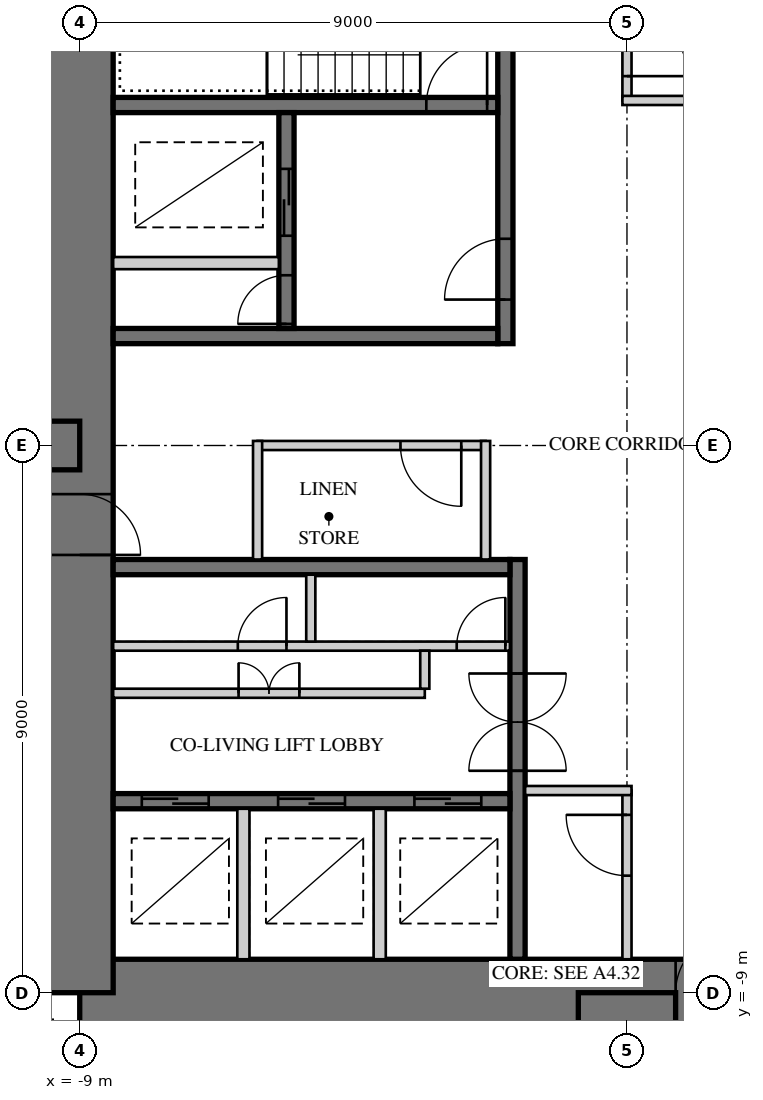
"""IFC4 building model, lengths in metres.
Left out: names, types, materials, properties, quantities, classifications, styles, units other than length and angle.
Written with IfcOpenShell. Run it as: python <this file> out.ifc"""

import sys

from ifc_helpers import new_model, si_unit, direction, frame, frame_2d, origin, place, context, subcontext, project, spatial, rectangle, extrude, element, fill, save


model = new_model("IFC4")
c1 = context("Model", 3, precision=1e-05, world=origin(), true_north=direction((0.0, 1.0)))
c2 = subcontext(c1, "Body", "Model", "MODEL_VIEW")
j1 = project(units=[si_unit("LENGTHUNIT", "METRE"), si_unit("PLANEANGLEUNIT", "RADIAN")], contexts=[c1])
p1 = place(None, origin())
s1 = spatial("IfcSite", under=j1, at=p1, CompositionType="ELEMENT")
p2 = place(p1, origin())
s2 = spatial("IfcBuilding", under=s1, at=p2, CompositionType="ELEMENT")
p3 = place(p2, frame((0.0, 0.0, 206.9)))
s3 = spatial("IfcBuildingStorey", under=s2, at=p3, CompositionType="ELEMENT", Elevation=206.9)
p4 = place(p3, frame((-9.0, -9.0, 0.0), z_axis=(0.0, 0.0, 1.0), x_axis=(1.0, 0.0, 0.0)))
e1 = element("IfcWall", 1, at=p4, inside=s3, PredefinedType="SHEAR", context=c2, shape_type="SweptSolid", body=[
    extrude(rectangle(XDim=18.0, YDim=1.1, at=frame_2d((9.0, 0.0))), origin(), (0.0, 0.0, 1.0), 3.4),
])
p5 = place(p4, frame((9.8, 0.0, 0.0)))
e2 = element("IfcOpeningElement", 2, at=p5, cuts=e1, PredefinedType="OPENING", context=c2, shape_type="SweptSolid", body=[
    extrude(rectangle(XDim=1.0, YDim=2.4, at=frame_2d((0.5, 1.2))), frame((0.0, 0.56, 0.0), z_axis=(0.0, -1.0, 0.0), x_axis=(1.0, 0.0, 0.0)), (0.0, 0.0, 1.0), 1.12),
])
p6 = place(p3, frame((-9.0, 9.0, 0.0), z_axis=(0.0, 0.0, 1.0), x_axis=(0.0, -1.0, 0.0)))
e3 = element("IfcWall", 3, at=p6, inside=s3, PredefinedType="SHEAR", context=c2, shape_type="SweptSolid", body=[
    extrude(rectangle(XDim=18.0, YDim=1.1, at=frame_2d((9.0, 0.0))), origin(), (0.0, 0.0, 1.0), 3.4),
])
p7 = place(p6, frame((9.8, 0.0, 0.0)))
e4 = element("IfcOpeningElement", 4, at=p7, cuts=e3, PredefinedType="OPENING", context=c2, shape_type="SweptSolid", body=[
    extrude(rectangle(XDim=1.0, YDim=2.4, at=frame_2d((0.5, 1.2))), frame((0.0, 0.56, 0.0), z_axis=(0.0, -1.0, 0.0), x_axis=(1.0, 0.0, 0.0)), (0.0, 0.0, 1.0), 1.12),
])
p8 = place(p3, frame((-2.0, 1.675, 0.0), z_axis=(0.0, 0.0, 1.0), x_axis=(0.0, 1.0, 0.0)))
e5 = element("IfcWall", 5, at=p8, inside=s3, PredefinedType="SHEAR", context=c2, shape_type="SweptSolid", body=[
    extrude(rectangle(XDim=6.775, YDim=0.25, at=frame_2d((3.387, 0.0))), origin(), (0.0, 0.0, 1.0), 3.4),
])
p9 = place(p8, frame((0.725, 0.0, 0.0)))
e6 = element("IfcOpeningElement", 6, at=p9, cuts=e5, PredefinedType="OPENING", context=c2, shape_type="SweptSolid", body=[
    extrude(rectangle(XDim=1.0, YDim=2.1, at=frame_2d((0.5, 1.05))), frame((0.0, 0.135, 0.0), z_axis=(0.0, -1.0, 0.0), x_axis=(1.0, 0.0, 0.0)), (0.0, 0.0, 1.0), 0.27),
])
p10 = place(p3, frame((-2.125, 1.8, 0.0), z_axis=(0.0, 0.0, 1.0), x_axis=(-1.0, 0.0, 0.0)))
e7 = element("IfcWall", 7, at=p10, inside=s3, PredefinedType="SHEAR", context=c2, shape_type="SweptSolid", body=[
    extrude(rectangle(XDim=6.325, YDim=0.25, at=frame_2d((3.163, 0.0))), origin(), (0.0, 0.0, 1.0), 3.4),
])
p11 = place(p3, frame((-2.125, 5.6, 0.0), z_axis=(0.0, 0.0, 1.0), x_axis=(-1.0, 0.0, 0.0)))
e8 = element("IfcWall", 8, at=p11, inside=s3, PredefinedType="SHEAR", context=c2, shape_type="SweptSolid", body=[
    extrude(rectangle(XDim=6.325, YDim=0.25, at=frame_2d((3.163, 0.0))), origin(), (0.0, 0.0, 1.0), 3.4),
])
p12 = place(p11, frame((0.175, 0.0, 0.0)))
e9 = element("IfcOpeningElement", 9, at=p12, cuts=e8, PredefinedType="OPENING", context=c2, shape_type="SweptSolid", body=[
    extrude(rectangle(XDim=1.0, YDim=2.1, at=frame_2d((0.5, 1.05))), frame((0.0, 0.135, 0.0), z_axis=(0.0, -1.0, 0.0), x_axis=(1.0, 0.0, 0.0)), (0.0, 0.0, 1.0), 0.27),
])
p13 = place(p3, frame((-5.6, 1.925, 0.0), z_axis=(0.0, 0.0, 1.0), x_axis=(0.0, 1.0, 0.0)))
e10 = element("IfcWall", 10, at=p13, inside=s3, PredefinedType="SHEAR", context=c2, shape_type="SweptSolid", body=[
    extrude(rectangle(XDim=3.55, YDim=0.25, at=frame_2d((1.775, 0.0))), origin(), (0.0, 0.0, 1.0), 3.4),
])
p14 = place(p13, frame((1.525, 0.0, 0.0)))
e11 = element("IfcOpeningElement", 11, at=p14, cuts=e10, PredefinedType="OPENING", context=c2, shape_type="SweptSolid", body=[
    extrude(rectangle(XDim=1.1, YDim=2.2, at=frame_2d((0.55, 1.1))), frame((0.0, 0.135, 0.0), z_axis=(0.0, -1.0, 0.0), x_axis=(1.0, 0.0, 0.0)), (0.0, 0.0, 1.0), 0.27),
])
p15 = place(p13, frame((0.075, 0.0, 0.0)))
e12 = element("IfcOpeningElement", 12, at=p15, cuts=e10, PredefinedType="OPENING", context=c2, shape_type="SweptSolid", body=[
    extrude(rectangle(XDim=0.8, YDim=2.1, at=frame_2d((0.4, 1.05))), frame((0.0, 0.135, 0.0), z_axis=(0.0, -1.0, 0.0), x_axis=(1.0, 0.0, 0.0)), (0.0, 0.0, 1.0), 0.27),
])
p16 = place(p3, frame((-5.725, 3.0, 0.0), z_axis=(0.0, 0.0, 1.0), x_axis=(-1.0, 0.0, 0.0)))
e13 = element("IfcWall", 13, at=p16, inside=s3, PredefinedType="PARTITIONING", context=c2, shape_type="SweptSolid", body=[
    extrude(rectangle(XDim=2.725, YDim=0.2, at=frame_2d((1.362, 0.0))), origin(), (0.0, 0.0, 1.0), 3.4),
])
p17 = place(p3, frame((-1.8, -1.875, 0.0), z_axis=(0.0, 0.0, 1.0), x_axis=(0.0, -1.0, 0.0)))
e14 = element("IfcWall", 14, at=p17, inside=s3, PredefinedType="SHEAR", context=c2, shape_type="SweptSolid", body=[
    extrude(rectangle(XDim=6.575, YDim=0.25, at=frame_2d((3.288, 0.0))), origin(), (0.0, 0.0, 1.0), 3.4),
])
p18 = place(p17, frame((1.875, 0.0, 0.0)))
e15 = element("IfcOpeningElement", 15, at=p18, cuts=e14, PredefinedType="OPENING", context=c2, shape_type="SweptSolid", body=[
    extrude(rectangle(XDim=1.6, YDim=2.4, at=frame_2d((0.8, 1.2))), frame((0.0, 0.135, 0.0), z_axis=(0.0, -1.0, 0.0), x_axis=(1.0, 0.0, 0.0)), (0.0, 0.0, 1.0), 0.27),
])
p19 = place(p3, frame((-1.925, -2.0, 0.0), z_axis=(0.0, 0.0, 1.0), x_axis=(-1.0, 0.0, 0.0)))
e16 = element("IfcWall", 16, at=p19, inside=s3, PredefinedType="SHEAR", context=c2, shape_type="SweptSolid", body=[
    extrude(rectangle(XDim=6.525, YDim=0.25, at=frame_2d((3.262, 0.0))), origin(), (0.0, 0.0, 1.0), 3.4),
])
p20 = place(p3, frame((-1.925, -5.85, 0.0), z_axis=(0.0, 0.0, 1.0), x_axis=(-1.0, 0.0, 0.0)))
e17 = element("IfcWall", 17, at=p20, inside=s3, PredefinedType="SHEAR", context=c2, shape_type="SweptSolid", body=[
    extrude(rectangle(XDim=6.525, YDim=0.25, at=frame_2d((3.262, 0.0))), origin(), (0.0, 0.0, 1.0), 3.4),
])
p21 = place(p20, frame((0.471, 0.0, 0.0)))
e18 = element("IfcOpeningElement", 18, at=p21, cuts=e17, PredefinedType="OPENING", context=c2, shape_type="SweptSolid", body=[
    extrude(rectangle(XDim=1.1, YDim=2.2, at=frame_2d((0.55, 1.1))), frame((0.0, 0.135, 0.0), z_axis=(0.0, -1.0, 0.0), x_axis=(1.0, 0.0, 0.0)), (0.0, 0.0, 1.0), 0.27),
])
p22 = place(p20, frame((2.712, 0.0, 0.0)))
e19 = element("IfcOpeningElement", 19, at=p22, cuts=e17, PredefinedType="OPENING", context=c2, shape_type="SweptSolid", body=[
    extrude(rectangle(XDim=1.1, YDim=2.2, at=frame_2d((0.55, 1.1))), frame((0.0, 0.135, 0.0), z_axis=(0.0, -1.0, 0.0), x_axis=(1.0, 0.0, 0.0)), (0.0, 0.0, 1.0), 0.27),
])
p23 = place(p20, frame((4.954, 0.0, 0.0)))
e20 = element("IfcOpeningElement", 20, at=p23, cuts=e17, PredefinedType="OPENING", context=c2, shape_type="SweptSolid", body=[
    extrude(rectangle(XDim=1.1, YDim=2.2, at=frame_2d((0.55, 1.1))), frame((0.0, 0.135, 0.0), z_axis=(0.0, -1.0, 0.0), x_axis=(1.0, 0.0, 0.0)), (0.0, 0.0, 1.0), 0.27),
])
p24 = place(p3, frame((-1.925, -3.3, 0.0), z_axis=(0.0, 0.0, 1.0), x_axis=(-1.0, 0.0, 0.0)))
e21 = element("IfcWall", 21, at=p24, inside=s3, PredefinedType="PARTITIONING", context=c2, shape_type="SweptSolid", body=[
    extrude(rectangle(XDim=6.525, YDim=0.15, at=frame_2d((3.262, 0.0))), origin(), (0.0, 0.0, 1.0), 3.4),
])
p25 = place(p24, frame((0.075, 0.0, 0.0)))
e22 = element("IfcOpeningElement", 22, at=p25, cuts=e21, PredefinedType="OPENING", context=c2, shape_type="SweptSolid", body=[
    extrude(rectangle(XDim=0.8, YDim=2.1, at=frame_2d((0.4, 1.05))), frame((0.0, 0.085, 0.0), z_axis=(0.0, -1.0, 0.0), x_axis=(1.0, 0.0, 0.0)), (0.0, 0.0, 1.0), 0.17),
])
p26 = place(p24, frame((3.675, 0.0, 0.0)))
e23 = element("IfcOpeningElement", 23, at=p26, cuts=e21, PredefinedType="OPENING", context=c2, shape_type="SweptSolid", body=[
    extrude(rectangle(XDim=0.8, YDim=2.1, at=frame_2d((0.4, 1.05))), frame((0.0, 0.085, 0.0), z_axis=(0.0, -1.0, 0.0), x_axis=(1.0, 0.0, 0.0)), (0.0, 0.0, 1.0), 0.17),
])
p27 = place(p3, frame((-5.2, -2.125, 0.0), z_axis=(0.0, 0.0, 1.0), x_axis=(0.0, -1.0, 0.0)))
e24 = element("IfcWall", 24, at=p27, inside=s3, PredefinedType="PARTITIONING", context=c2, shape_type="SweptSolid", body=[
    extrude(rectangle(XDim=1.1, YDim=0.15, at=frame_2d((0.55, 0.0))), origin(), (0.0, 0.0, 1.0), 3.4),
])
for number, where, z_axis, x_axis in (
    (25, (-4.067, -5.975, 0.0), (0.0, 0.0, 1.0), (0.0, -1.0, 0.0)),
    (26, (-6.308, -5.975, 0.0), (0.0, 0.0, 1.0), (0.0, -1.0, 0.0)),
):
    element("IfcWall", number, at=place(p3, frame(where, z_axis=z_axis, x_axis=x_axis)), inside=s3, PredefinedType="PARTITIONING", context=c2, shape_type="SweptSolid", body=[
        extrude(rectangle(XDim=2.475, YDim=0.2, at=frame_2d((1.237, 0.0))), origin(), (0.0, 0.0, 1.0), 3.4),
    ])
p28 = place(p3, frame((0.0, -9.0, 0.0), z_axis=(0.0, 0.0, 1.0), x_axis=(0.0, -1.0, 0.0)))
e27 = element("IfcWall", 27, at=p28, inside=s3, PredefinedType="SHEAR", context=c2, shape_type="SweptSolid", body=[
    extrude(rectangle(XDim=4.05, YDim=1.6, at=frame_2d((2.025, 0.0))), origin(), (0.0, 0.0, 1.0), 3.4),
])
p29 = place(p3, frame((-9.0, 0.0, 0.0), z_axis=(0.0, 0.0, 1.0), x_axis=(-1.0, 0.0, 0.0)))
e28 = element("IfcWall", 28, at=p29, inside=s3, PredefinedType="SHEAR", context=c2, shape_type="SweptSolid", body=[
    extrude(rectangle(XDim=18.0, YDim=0.8, at=frame_2d((9.0, 0.0))), origin(), (0.0, 0.0, 1.0), 3.4),
])
p30 = place(p29, frame((3.95, 0.0, 0.0)))
e29 = element("IfcOpeningElement", 29, at=p30, cuts=e28, PredefinedType="OPENING", context=c2, shape_type="SweptSolid", body=[
    extrude(rectangle(XDim=1.0, YDim=2.15, at=frame_2d((0.5, 1.075))), frame((0.0, 0.41, 0.0), z_axis=(0.0, -1.0, 0.0), x_axis=(1.0, 0.0, 0.0)), (0.0, 0.0, 1.0), 0.82),
])
p31 = place(p29, frame((6.6, 0.0, 0.0)))
e30 = element("IfcOpeningElement", 30, at=p31, cuts=e28, PredefinedType="OPENING", context=c2, shape_type="SweptSolid", body=[
    extrude(rectangle(XDim=1.0, YDim=2.15, at=frame_2d((0.5, 1.075))), frame((0.0, 0.41, 0.0), z_axis=(0.0, -1.0, 0.0), x_axis=(1.0, 0.0, 0.0)), (0.0, 0.0, 1.0), 0.82),
])
p32 = place(p29, frame((13.25, 0.0, 0.0)))
e31 = element("IfcOpeningElement", 31, at=p32, cuts=e28, PredefinedType="OPENING", context=c2, shape_type="SweptSolid", body=[
    extrude(rectangle(XDim=1.0, YDim=2.2, at=frame_2d((0.5, 1.1))), frame((0.0, 0.41, 0.0), z_axis=(0.0, -1.0, 0.0), x_axis=(1.0, 0.0, 0.0)), (0.0, 0.0, 1.0), 0.82),
])
p33 = place(p3, frame((-9.57, -9.445, 0.0), z_axis=(0.0, 0.0, 1.0), x_axis=(0.0, -1.0, 0.0)))
e32 = element("IfcWall", 32, at=p33, inside=s3, PredefinedType="SOLIDWALL", context=c2, shape_type="SweptSolid", body=[
    extrude(rectangle(XDim=3.125, YDim=0.25, at=frame_2d((1.562, 0.0))), origin(), (0.0, 0.0, 1.0), 3.22),
])
p34 = place(p33, frame((0.6, 0.0, 0.0)))
e33 = element("IfcOpeningElement", 33, at=p34, cuts=e32, PredefinedType="OPENING", context=c2, shape_type="SweptSolid", body=[
    extrude(rectangle(XDim=1.0, YDim=2.2, at=frame_2d((0.5, 1.1))), frame((0.0, 0.135, 0.0), z_axis=(0.0, -1.0, 0.0), x_axis=(1.0, 0.0, 0.0)), (0.0, 0.0, 1.0), 0.27),
])
p35 = place(p3, frame((-2.325, 0.0, 0.0), z_axis=(0.0, 0.0, 1.0), x_axis=(-1.0, 0.0, 0.0)))
e34 = element("IfcWall", 34, at=p35, inside=s3, PredefinedType="PARTITIONING", context=c2, shape_type="SweptSolid", body=[
    extrude(rectangle(XDim=3.75, YDim=0.15, at=frame_2d((1.875, 0.0))), origin(), (0.0, 0.0, 1.0), 3.22),
])
p36 = place(p35, frame((0.4, 0.0, 0.0)))
e35 = element("IfcOpeningElement", 35, at=p36, cuts=e34, PredefinedType="OPENING", context=c2, shape_type="SweptSolid", body=[
    extrude(rectangle(XDim=1.0, YDim=2.1, at=frame_2d((0.5, 1.05))), frame((0.0, 0.085, 0.0), z_axis=(0.0, -1.0, 0.0), x_axis=(1.0, 0.0, 0.0)), (0.0, 0.0, 1.0), 0.17),
])
for number, where, z_axis, x_axis in (
    (36, (-2.325, -1.875, 0.0), (0.0, 0.0, 1.0), (0.0, 1.0, 0.0)),
    (37, (-6.075, 0.075, 0.0), (0.0, 0.0, 1.0), (0.0, -1.0, 0.0)),
):
    element("IfcWall", number, at=place(p3, frame(where, z_axis=z_axis, x_axis=x_axis)), inside=s3, PredefinedType="PARTITIONING", context=c2, shape_type="SweptSolid", body=[
        extrude(rectangle(XDim=1.95, YDim=0.15, at=frame_2d((0.975, 0.0))), origin(), (0.0, 0.0, 1.0), 3.22),
    ])
p37 = place(p3, frame((0.0, 5.675, 0.0), z_axis=(0.0, 0.0, 1.0), x_axis=(0.0, 1.0, 0.0)))
e38 = element("IfcWall", 38, at=p37, inside=s3, PredefinedType="PARTITIONING", context=c2, shape_type="SweptSolid", body=[
    extrude(rectangle(XDim=2.775, YDim=0.15, at=frame_2d((1.387, 0.0))), origin(), (0.0, 0.0, 1.0), 3.22),
])
p38 = place(p37, frame((0.4, 0.0, 0.0)))
e39 = element("IfcOpeningElement", 39, at=p38, cuts=e38, PredefinedType="OPENING", context=c2, shape_type="SweptSolid", body=[
    extrude(rectangle(XDim=1.0, YDim=2.1, at=frame_2d((0.5, 1.05))), frame((0.0, 0.085, 0.0), z_axis=(0.0, -1.0, 0.0), x_axis=(1.0, 0.0, 0.0)), (0.0, 0.0, 1.0), 0.17),
])
p39 = place(p3, frame((1.675, 5.675, 0.0), z_axis=(0.0, 0.0, 1.0), x_axis=(-1.0, 0.0, 0.0)))
e40 = element("IfcWall", 40, at=p39, inside=s3, PredefinedType="PARTITIONING", context=c2, shape_type="SweptSolid", body=[
    extrude(rectangle(XDim=1.75, YDim=0.15, at=frame_2d((0.875, 0.0))), origin(), (0.0, 0.0, 1.0), 3.22),
])
p40 = place(p3, frame((0.0, -5.675, 0.0), z_axis=(0.0, 0.0, 1.0), x_axis=(0.0, -1.0, 0.0)))
e41 = element("IfcWall", 41, at=p40, inside=s3, PredefinedType="PARTITIONING", context=c2, shape_type="SweptSolid", body=[
    extrude(rectangle(XDim=2.775, YDim=0.15, at=frame_2d((1.387, 0.0))), origin(), (0.0, 0.0, 1.0), 3.22),
])
p41 = place(p40, frame((0.4, 0.0, 0.0)))
e42 = element("IfcOpeningElement", 42, at=p41, cuts=e41, PredefinedType="OPENING", context=c2, shape_type="SweptSolid", body=[
    extrude(rectangle(XDim=1.0, YDim=2.1, at=frame_2d((0.5, 1.05))), frame((0.0, 0.085, 0.0), z_axis=(0.0, -1.0, 0.0), x_axis=(1.0, 0.0, 0.0)), (0.0, 0.0, 1.0), 0.17),
])
p42 = place(p3, frame((-1.675, -5.675, 0.0), z_axis=(0.0, 0.0, 1.0), x_axis=(1.0, 0.0, 0.0)))
e43 = element("IfcWall", 43, at=p42, inside=s3, PredefinedType="PARTITIONING", context=c2, shape_type="SweptSolid", body=[
    extrude(rectangle(XDim=1.75, YDim=0.15, at=frame_2d((0.875, 0.0))), origin(), (0.0, 0.0, 1.0), 3.22),
])
p43 = place(p3, frame((-3.325, -4.075, 0.0), z_axis=(0.0, 0.0, 1.0), x_axis=(-1.0, 0.0, 0.0)))
e44 = element("IfcWall", 44, at=p43, inside=s3, PredefinedType="PARTITIONING", context=c2, shape_type="SweptSolid", body=[
    extrude(rectangle(XDim=5.125, YDim=0.15, at=frame_2d((2.562, 0.0))), origin(), (0.0, 0.0, 1.0), 3.22),
])
p44 = place(p43, frame((2.062, 0.0, 0.0)))
e45 = element("IfcOpeningElement", 45, at=p44, cuts=e44, PredefinedType="OPENING", context=c2, shape_type="SweptSolid", body=[
    extrude(rectangle(XDim=1.0, YDim=2.1, at=frame_2d((0.5, 1.05))), frame((0.0, 0.085, 0.0), z_axis=(0.0, -1.0, 0.0), x_axis=(1.0, 0.0, 0.0)), (0.0, 0.0, 1.0), 0.17),
])
p45 = place(p3, frame((-3.325, -3.375, 0.0), z_axis=(0.0, 0.0, 1.0), x_axis=(0.0, -1.0, 0.0)))
e46 = element("IfcWall", 46, at=p45, inside=s3, PredefinedType="PARTITIONING", context=c2, shape_type="SweptSolid", body=[
    extrude(rectangle(XDim=0.625, YDim=0.15, at=frame_2d((0.312, 0.0))), origin(), (0.0, 0.0, 1.0), 3.22),
])
p46 = place(p36, origin())
e47 = element("IfcDoor", 47, at=p46, inside=s3, OperationType="SINGLE_SWING_LEFT", PredefinedType="DOOR", context=c2, shape_type="SweptSolid", body=[
    extrude(rectangle(XDim=1.0, YDim=2.1, at=frame_2d((0.5, 1.05))), frame((0.0, 0.025, 0.0), z_axis=(0.0, -1.0, 0.0), x_axis=(1.0, 0.0, 0.0)), (0.0, 0.0, 1.0), 0.05),
])
fill(e35, e47)
p47 = place(p38, frame((1.0, 0.0, 0.0), z_axis=(0.0, 0.0, 1.0), x_axis=(-1.0, 0.0, 0.0)))
e48 = element("IfcDoor", 48, at=p47, inside=s3, OperationType="SINGLE_SWING_RIGHT", PredefinedType="DOOR", context=c2, shape_type="SweptSolid", body=[
    extrude(rectangle(XDim=1.0, YDim=2.1, at=frame_2d((0.5, 1.05))), frame((0.0, 0.025, 0.0), z_axis=(0.0, -1.0, 0.0), x_axis=(1.0, 0.0, 0.0)), (0.0, 0.0, 1.0), 0.05),
])
fill(e39, e48)
p48 = place(p41, frame((1.0, 0.0, 0.0), z_axis=(0.0, 0.0, 1.0), x_axis=(-1.0, 0.0, 0.0)))
e49 = element("IfcDoor", 49, at=p48, inside=s3, OperationType="SINGLE_SWING_RIGHT", PredefinedType="DOOR", context=c2, shape_type="SweptSolid", body=[
    extrude(rectangle(XDim=1.0, YDim=2.1, at=frame_2d((0.5, 1.05))), frame((0.0, 0.025, 0.0), z_axis=(0.0, -1.0, 0.0), x_axis=(1.0, 0.0, 0.0)), (0.0, 0.0, 1.0), 0.05),
])
fill(e42, e49)
p49 = place(p44, frame((1.0, 0.0, 0.0), z_axis=(0.0, 0.0, 1.0), x_axis=(-1.0, 0.0, 0.0)))
e50 = element("IfcDoor", 50, at=p49, inside=s3, OperationType="DOUBLE_DOOR_SINGLE_SWING", PredefinedType="DOOR", context=c2, shape_type="SweptSolid", body=[
    extrude(rectangle(XDim=1.0, YDim=2.1, at=frame_2d((0.5, 1.05))), frame((0.0, 0.025, 0.0), z_axis=(0.0, -1.0, 0.0), x_axis=(1.0, 0.0, 0.0)), (0.0, 0.0, 1.0), 0.05),
])
fill(e45, e50)
p50 = place(p5, origin())
e51 = element("IfcDoor", 51, at=p50, inside=s3, OperationType="SINGLE_SWING_RIGHT", PredefinedType="DOOR", context=c2, shape_type="SweptSolid", body=[
    extrude(rectangle(XDim=1.0, YDim=2.4, at=frame_2d((0.5, 1.2))), frame((0.0, 0.055, 0.0), z_axis=(0.0, -1.0, 0.0), x_axis=(1.0, 0.0, 0.0)), (0.0, 0.0, 1.0), 0.05),
])
fill(e2, e51)
p51 = place(p7, origin())
e52 = element("IfcDoor", 52, at=p51, inside=s3, OperationType="SINGLE_SWING_RIGHT", PredefinedType="DOOR", context=c2, shape_type="SweptSolid", body=[
    extrude(rectangle(XDim=1.0, YDim=2.4, at=frame_2d((0.5, 1.2))), frame((0.0, 0.055, 0.0), z_axis=(0.0, -1.0, 0.0), x_axis=(1.0, 0.0, 0.0)), (0.0, 0.0, 1.0), 0.05),
])
fill(e4, e52)
p52 = place(p9, origin())
e53 = element("IfcDoor", 53, at=p52, inside=s3, OperationType="SINGLE_SWING_LEFT", PredefinedType="DOOR", context=c2, shape_type="SweptSolid", body=[
    extrude(rectangle(XDim=1.0, YDim=2.1, at=frame_2d((0.5, 1.05))), frame((0.0, 0.025, 0.0), z_axis=(0.0, -1.0, 0.0), x_axis=(1.0, 0.0, 0.0)), (0.0, 0.0, 1.0), 0.05),
])
fill(e6, e53)
p53 = place(p12, frame((1.0, 0.0, 0.0), z_axis=(0.0, 0.0, 1.0), x_axis=(-1.0, 0.0, 0.0)))
e54 = element("IfcDoor", 54, at=p53, inside=s3, OperationType="SINGLE_SWING_RIGHT", PredefinedType="DOOR", context=c2, shape_type="SweptSolid", body=[
    extrude(rectangle(XDim=1.0, YDim=2.1, at=frame_2d((0.5, 1.05))), frame((0.0, 0.025, 0.0), z_axis=(0.0, -1.0, 0.0), x_axis=(1.0, 0.0, 0.0)), (0.0, 0.0, 1.0), 0.05),
])
fill(e9, e54)
p54 = place(p14, origin())
e55 = element("IfcDoor", 55, at=p54, inside=s3, OperationType="DOUBLE_DOOR_SLIDING", PredefinedType="DOOR", context=c2, shape_type="SweptSolid", body=[
    extrude(rectangle(XDim=1.1, YDim=2.2, at=frame_2d((0.55, 1.1))), frame((0.0, 0.025, 0.0), z_axis=(0.0, -1.0, 0.0), x_axis=(1.0, 0.0, 0.0)), (0.0, 0.0, 1.0), 0.05),
])
fill(e11, e55)
p55 = place(p15, origin())
e56 = element("IfcDoor", 56, at=p55, inside=s3, OperationType="SINGLE_SWING_LEFT", PredefinedType="DOOR", context=c2, shape_type="SweptSolid", body=[
    extrude(rectangle(XDim=0.8, YDim=2.1, at=frame_2d((0.4, 1.05))), frame((0.0, 0.025, 0.0), z_axis=(0.0, -1.0, 0.0), x_axis=(1.0, 0.0, 0.0)), (0.0, 0.0, 1.0), 0.05),
])
fill(e12, e56)
p56 = place(p21, origin())
e57 = element("IfcDoor", 57, at=p56, inside=s3, OperationType="DOUBLE_DOOR_SLIDING", PredefinedType="DOOR", context=c2, shape_type="SweptSolid", body=[
    extrude(rectangle(XDim=1.1, YDim=2.2, at=frame_2d((0.55, 1.1))), frame((0.0, 0.025, 0.0), z_axis=(0.0, -1.0, 0.0), x_axis=(1.0, 0.0, 0.0)), (0.0, 0.0, 1.0), 0.05),
])
fill(e18, e57)
p57 = place(p22, origin())
e58 = element("IfcDoor", 58, at=p57, inside=s3, OperationType="DOUBLE_DOOR_SLIDING", PredefinedType="DOOR", context=c2, shape_type="SweptSolid", body=[
    extrude(rectangle(XDim=1.1, YDim=2.2, at=frame_2d((0.55, 1.1))), frame((0.0, 0.025, 0.0), z_axis=(0.0, -1.0, 0.0), x_axis=(1.0, 0.0, 0.0)), (0.0, 0.0, 1.0), 0.05),
])
fill(e19, e58)
p58 = place(p23, origin())
e59 = element("IfcDoor", 59, at=p58, inside=s3, OperationType="DOUBLE_DOOR_SLIDING", PredefinedType="DOOR", context=c2, shape_type="SweptSolid", body=[
    extrude(rectangle(XDim=1.1, YDim=2.2, at=frame_2d((0.55, 1.1))), frame((0.0, 0.025, 0.0), z_axis=(0.0, -1.0, 0.0), x_axis=(1.0, 0.0, 0.0)), (0.0, 0.0, 1.0), 0.05),
])
fill(e20, e59)
p59 = place(p18, origin())
e60 = element("IfcDoor", 60, at=p59, inside=s3, OperationType="DOUBLE_DOOR_DOUBLE_SWING", PredefinedType="DOOR", context=c2, shape_type="SweptSolid", body=[
    extrude(rectangle(XDim=1.6, YDim=2.4, at=frame_2d((0.8, 1.2))), frame((0.0, 0.025, 0.0), z_axis=(0.0, -1.0, 0.0), x_axis=(1.0, 0.0, 0.0)), (0.0, 0.0, 1.0), 0.05),
])
fill(e15, e60)
p60 = place(p25, frame((0.8, 0.0, 0.0), z_axis=(0.0, 0.0, 1.0), x_axis=(-1.0, 0.0, 0.0)))
e61 = element("IfcDoor", 61, at=p60, inside=s3, OperationType="SINGLE_SWING_RIGHT", PredefinedType="DOOR", context=c2, shape_type="SweptSolid", body=[
    extrude(rectangle(XDim=0.8, YDim=2.1, at=frame_2d((0.4, 1.05))), frame((0.0, 0.025, 0.0), z_axis=(0.0, -1.0, 0.0), x_axis=(1.0, 0.0, 0.0)), (0.0, 0.0, 1.0), 0.05),
])
fill(e22, e61)
p61 = place(p26, frame((0.8, 0.0, 0.0), z_axis=(0.0, 0.0, 1.0), x_axis=(-1.0, 0.0, 0.0)))
e62 = element("IfcDoor", 62, at=p61, inside=s3, OperationType="SINGLE_SWING_RIGHT", PredefinedType="DOOR", context=c2, shape_type="SweptSolid", body=[
    extrude(rectangle(XDim=0.8, YDim=2.1, at=frame_2d((0.4, 1.05))), frame((0.0, 0.025, 0.0), z_axis=(0.0, -1.0, 0.0), x_axis=(1.0, 0.0, 0.0)), (0.0, 0.0, 1.0), 0.05),
])
fill(e23, e62)
save(model, sys.argv[1])
